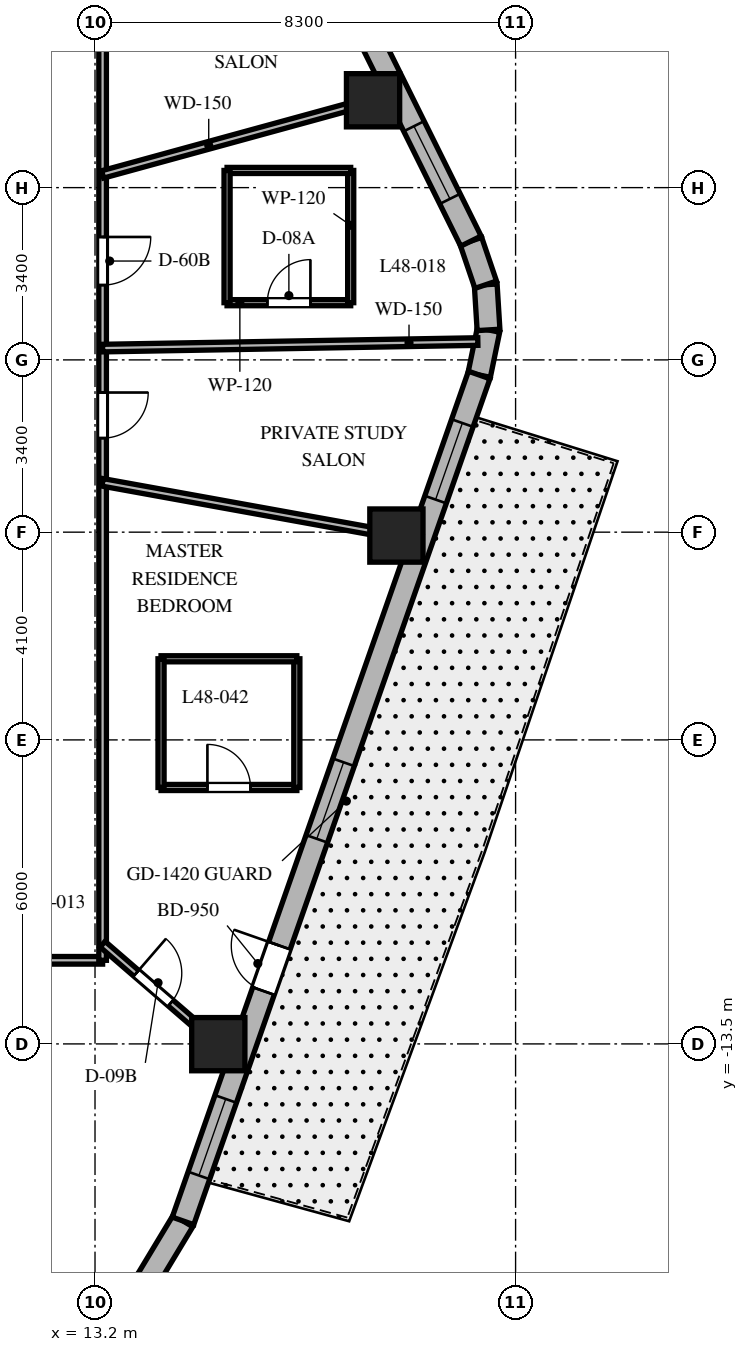
"""IFC4 building model, lengths in metres.
Left out: names, types, materials, properties, quantities, classifications, styles, units other than length and angle.
Written with IfcOpenShell. Run it as: python <this file> out.ifc"""

import sys

from ifc_helpers import new_model, si_unit, direction, frame, frame_2d, origin, origin_2d, place, context, subcontext, project, spatial, rectangle, extrude, element, fill, save


model = new_model("IFC4")
c1 = context("Model", 3, precision=1e-05, world=origin(), true_north=direction((0.0, 1.0)))
c2 = subcontext(c1, "Body", "Model", "MODEL_VIEW")
j1 = project(units=[si_unit("LENGTHUNIT", "METRE"), si_unit("PLANEANGLEUNIT", "RADIAN")], contexts=[c1])
p1 = place(None, origin())
s1 = spatial("IfcSite", under=j1, at=p1, CompositionType="ELEMENT")
p2 = place(p1, origin())
s2 = spatial("IfcBuilding", under=s1, at=p2, CompositionType="ELEMENT")
p3 = place(p2, frame((0.0, 0.0, 194.1)))
s3 = spatial("IfcBuildingStorey", under=s2, at=p3, CompositionType="ELEMENT", Elevation=194.1)
for number, where, z_axis, x_axis in (
    (1, (15.633, -13.505, 0.0), (0.0, 0.0, 1.0), (1.0, 0.0, 0.0)),
    (2, (19.148, -3.467, 0.0), (0.0, 0.0, 1.0), (1.0, 0.0, 0.0)),
    (3, (18.687, 5.124, 0.0), (0.0, 0.0, 1.0), (1.0, 0.0, 0.0)),
):
    element("IfcColumn", number, at=place(p3, frame(where, z_axis=z_axis, x_axis=x_axis)), inside=s3, PredefinedType="COLUMN", context=c2, shape_type="SweptSolid", body=[
        extrude(rectangle(XDim=1.05, YDim=1.05, at=origin_2d()), origin(), (0.0, 0.0, 1.0), 3.7),
    ])
p4 = place(p3, frame((14.214, -18.192, 0.0), z_axis=(0.0, 0.0, 1.0), x_axis=(0.516340945502, 0.856383108193, 0.0)))
e4 = element("IfcWall", 4, at=p4, inside=s3, PredefinedType="SOLIDWALL", context=c2, shape_type="SweptSolid", body=[
    extrude(rectangle(XDim=1.4, YDim=0.45, at=frame_2d((0.7, 0.0))), origin(), (0.0, 0.0, 1.0), 3.4),
])
p5 = place(p3, frame((20.782, -0.298, 0.0), z_axis=(0.0, 0.0, 1.0), x_axis=(0.202570068411, 0.979267771033, 0.0)))
e5 = element("IfcWall", 5, at=p5, inside=s3, PredefinedType="SOLIDWALL", context=c2, shape_type="SweptSolid", body=[
    extrude(rectangle(XDim=0.909, YDim=0.45, at=frame_2d((0.454, 0.0))), origin(), (0.0, 0.0, 1.0), 3.4),
])
p6 = place(p3, frame((20.966, 0.592, 0.0), z_axis=(0.0, 0.0, 1.0), x_axis=(-0.061748898935, 0.998091715966, 0.0)))
e6 = element("IfcWall", 6, at=p6, inside=s3, PredefinedType="SOLIDWALL", context=c2, shape_type="SweptSolid", body=[
    extrude(rectangle(XDim=0.894, YDim=0.45, at=frame_2d((0.447, 0.0))), origin(), (0.0, 0.0, 1.0), 3.4),
])
p7 = place(p3, frame((20.911, 1.484, 0.0), z_axis=(0.0, 0.0, 1.0), x_axis=(-0.321623334353, 0.946867694453, 0.0)))
e7 = element("IfcWall", 7, at=p7, inside=s3, PredefinedType="SOLIDWALL", context=c2, shape_type="SweptSolid", body=[
    extrude(rectangle(XDim=0.909, YDim=0.45, at=frame_2d((0.454, 0.0))), origin(), (0.0, 0.0, 1.0), 3.4),
])
p8 = place(p3, frame((14.937, -16.993, 0.0), z_axis=(0.0, 0.0, 1.0), x_axis=(0.330431575061, 0.943829949834, 0.0)))
e8 = element("IfcWall", 8, at=p8, inside=s3, PredefinedType="SOLIDWALL", context=c2, shape_type="SweptSolid", body=[
    extrude(rectangle(XDim=17.689, YDim=0.45, at=frame_2d((8.844, 0.0))), origin(), (0.0, 0.0, 1.0), 3.4),
])
p9 = place(p8, frame((4.807, 0.0, 0.0)))
e9 = element("IfcOpeningElement", 9, at=p9, cuts=e8, PredefinedType="OPENING", context=c2, shape_type="SweptSolid", body=[
    extrude(rectangle(XDim=0.95, YDim=2.15, at=frame_2d((0.475, 1.075))), frame((0.0, 0.235, 0.0), z_axis=(0.0, -1.0, 0.0), x_axis=(1.0, 0.0, 0.0)), (0.0, 0.0, 1.0), 0.47),
])
p10 = place(p8, frame((0.95, 0.0, 0.8)))
e10 = element("IfcOpeningElement", 10, at=p10, cuts=e8, PredefinedType="OPENING", context=c2, shape_type="SweptSolid", body=[
    extrude(rectangle(XDim=1.6, YDim=1.75, at=frame_2d((0.8, 0.875))), frame((0.0, 0.235, 0.0), z_axis=(0.0, -1.0, 0.0), x_axis=(1.0, 0.0, 0.0)), (0.0, 0.0, 1.0), 0.47),
])
p11 = place(p8, frame((7.99, 0.0, 0.8)))
e11 = element("IfcOpeningElement", 11, at=p11, cuts=e8, PredefinedType="OPENING", context=c2, shape_type="SweptSolid", body=[
    extrude(rectangle(XDim=1.6, YDim=1.75, at=frame_2d((0.8, 0.875))), frame((0.0, 0.235, 0.0), z_axis=(0.0, -1.0, 0.0), x_axis=(1.0, 0.0, 0.0)), (0.0, 0.0, 1.0), 0.47),
])
p12 = place(p8, frame((15.084, 0.0, 0.8)))
e12 = element("IfcOpeningElement", 12, at=p12, cuts=e8, PredefinedType="OPENING", context=c2, shape_type="SweptSolid", body=[
    extrude(rectangle(XDim=1.6, YDim=1.75, at=frame_2d((0.8, 0.875))), frame((0.0, 0.235, 0.0), z_axis=(0.0, -1.0, 0.0), x_axis=(1.0, 0.0, 0.0)), (0.0, 0.0, 1.0), 0.47),
])
p13 = place(p3, frame((20.618, 2.344, 0.0), z_axis=(0.0, 0.0, 1.0), x_axis=(-0.444243691097, 0.895905990002, 0.0)))
e13 = element("IfcWall", 13, at=p13, inside=s3, PredefinedType="SOLIDWALL", context=c2, shape_type="SweptSolid", body=[
    extrude(rectangle(XDim=16.784, YDim=0.45, at=frame_2d((8.392, 0.0))), origin(), (0.0, 0.0, 1.0), 3.4),
])
p14 = place(p13, frame((0.931, 0.0, 0.8)))
e14 = element("IfcOpeningElement", 14, at=p14, cuts=e13, PredefinedType="OPENING", context=c2, shape_type="SweptSolid", body=[
    extrude(rectangle(XDim=1.6, YDim=1.75, at=frame_2d((0.8, 0.875))), frame((0.0, 0.235, 0.0), z_axis=(0.0, -1.0, 0.0), x_axis=(1.0, 0.0, 0.0)), (0.0, 0.0, 1.0), 0.47),
])
p15 = place(p13, frame((7.642, 0.0, 0.8)))
e15 = element("IfcOpeningElement", 15, at=p15, cuts=e13, PredefinedType="OPENING", context=c2, shape_type="SweptSolid", body=[
    extrude(rectangle(XDim=1.6, YDim=1.75, at=frame_2d((0.8, 0.875))), frame((0.0, 0.235, 0.0), z_axis=(0.0, -1.0, 0.0), x_axis=(1.0, 0.0, 0.0)), (0.0, 0.0, 1.0), 0.47),
])
p16 = place(p13, frame((14.303, 0.0, 0.8)))
e16 = element("IfcOpeningElement", 16, at=p16, cuts=e13, PredefinedType="OPENING", context=c2, shape_type="SweptSolid", body=[
    extrude(rectangle(XDim=1.6, YDim=1.75, at=frame_2d((0.8, 0.875))), frame((0.0, 0.235, 0.0), z_axis=(0.0, -1.0, 0.0), x_axis=(1.0, 0.0, 0.0)), (0.0, 0.0, 1.0), 0.47),
])
p17 = place(p3, frame((13.35, -11.85, 0.0), z_axis=(0.0, 0.0, 1.0), x_axis=(-1.0, 0.0, 0.0)))
e17 = element("IfcWall", 17, at=p17, inside=s3, PredefinedType="PARTITIONING", context=c2, shape_type="SweptSolid", body=[
    extrude(rectangle(XDim=26.7, YDim=0.15, at=frame_2d((13.35, 0.0))), origin(), (0.0, 0.0, 1.0), 2.84),
])
p18 = place(p17, frame((20.682, 0.0, 0.0)))
e18 = element("IfcOpeningElement", 18, at=p18, cuts=e17, PredefinedType="OPENING", context=c2, shape_type="SweptSolid", body=[
    extrude(rectangle(XDim=0.95, YDim=2.03, at=frame_2d((0.475, 1.015))), frame((0.0, 0.085, 0.0), z_axis=(0.0, -1.0, 0.0), x_axis=(1.0, 0.0, 0.0)), (0.0, 0.0, 1.0), 0.17),
])
p19 = place(p17, frame((14.708, 0.0, 0.0)))
e19 = element("IfcOpeningElement", 19, at=p19, cuts=e17, PredefinedType="OPENING", context=c2, shape_type="SweptSolid", body=[
    extrude(rectangle(XDim=0.95, YDim=2.03, at=frame_2d((0.475, 1.015))), frame((0.0, 0.085, 0.0), z_axis=(0.0, -1.0, 0.0), x_axis=(1.0, 0.0, 0.0)), (0.0, 0.0, 1.0), 0.17),
])
p20 = place(p17, frame((10.553, 0.0, 0.0)))
e20 = element("IfcOpeningElement", 20, at=p20, cuts=e17, PredefinedType="OPENING", context=c2, shape_type="SweptSolid", body=[
    extrude(rectangle(XDim=0.95, YDim=2.03, at=frame_2d((0.475, 1.015))), frame((0.0, 0.085, 0.0), z_axis=(0.0, -1.0, 0.0), x_axis=(1.0, 0.0, 0.0)), (0.0, 0.0, 1.0), 0.17),
])
p21 = place(p17, frame((3.97, 0.0, 0.0)))
e21 = element("IfcOpeningElement", 21, at=p21, cuts=e17, PredefinedType="OPENING", context=c2, shape_type="SweptSolid", body=[
    extrude(rectangle(XDim=1.0, YDim=2.03, at=frame_2d((0.5, 1.015))), frame((0.0, 0.085, 0.0), z_axis=(0.0, -1.0, 0.0), x_axis=(1.0, 0.0, 0.0)), (0.0, 0.0, 1.0), 0.17),
])
p22 = place(p3, frame((13.35, 11.85, 0.0), z_axis=(0.0, 0.0, 1.0), x_axis=(0.0, -1.0, 0.0)))
e22 = element("IfcWall", 22, at=p22, inside=s3, PredefinedType="PARTITIONING", context=c2, shape_type="SweptSolid", body=[
    extrude(rectangle(XDim=23.7, YDim=0.15, at=frame_2d((11.85, 0.0))), origin(), (0.0, 0.0, 1.0), 2.84),
])
p23 = place(p22, frame((9.424, 0.0, 0.0)))
e23 = element("IfcOpeningElement", 23, at=p23, cuts=e22, PredefinedType="OPENING", context=c2, shape_type="SweptSolid", body=[
    extrude(rectangle(XDim=0.95, YDim=2.03, at=frame_2d((0.475, 1.015))), frame((0.0, 0.085, 0.0), z_axis=(0.0, -1.0, 0.0), x_axis=(1.0, 0.0, 0.0)), (0.0, 0.0, 1.0), 0.17),
])
p24 = place(p22, frame((3.765, 0.0, 0.0)))
e24 = element("IfcOpeningElement", 24, at=p24, cuts=e22, PredefinedType="OPENING", context=c2, shape_type="SweptSolid", body=[
    extrude(rectangle(XDim=0.9, YDim=2.03, at=frame_2d((0.45, 1.015))), frame((0.0, 0.085, 0.0), z_axis=(0.0, -1.0, 0.0), x_axis=(1.0, 0.0, 0.0)), (0.0, 0.0, 1.0), 0.17),
])
p25 = place(p22, frame((12.494, 0.0, 0.0)))
e25 = element("IfcOpeningElement", 25, at=p25, cuts=e22, PredefinedType="OPENING", context=c2, shape_type="SweptSolid", body=[
    extrude(rectangle(XDim=0.9, YDim=2.03, at=frame_2d((0.45, 1.015))), frame((0.0, 0.085, 0.0), z_axis=(0.0, -1.0, 0.0), x_axis=(1.0, 0.0, 0.0)), (0.0, 0.0, 1.0), 0.17),
])
p26 = place(p3, frame((13.35, 0.233, 0.0), z_axis=(0.0, 0.0, 1.0), x_axis=(0.999847932133, 0.017438824797, 0.0)))
e26 = element("IfcWall", 26, at=p26, inside=s3, PredefinedType="PARTITIONING", context=c2, shape_type="SweptSolid", body=[
    extrude(rectangle(XDim=7.406, YDim=0.15, at=frame_2d((3.703, 0.0))), origin(), (0.0, 0.0, 1.0), 2.64),
])
p27 = place(p3, frame((13.35, 3.661, 0.0), z_axis=(0.0, 0.0, 1.0), x_axis=(0.964397145454, 0.264458211898, 0.0)))
e27 = element("IfcWall", 27, at=p27, inside=s3, PredefinedType="PARTITIONING", context=c2, shape_type="SweptSolid", body=[
    extrude(rectangle(XDim=6.039, YDim=0.15, at=frame_2d((3.019, 0.0))), origin(), (0.0, 0.0, 1.0), 2.64),
])
p28 = place(p3, frame((13.35, -11.533, 0.0), z_axis=(0.0, 0.0, 1.0), x_axis=(0.756711647314, -0.65374879183, 0.0)))
e28 = element("IfcWall", 28, at=p28, inside=s3, PredefinedType="PARTITIONING", context=c2, shape_type="SweptSolid", body=[
    extrude(rectangle(XDim=3.55, YDim=0.15, at=frame_2d((1.775, 0.0))), origin(), (0.0, 0.0, 1.0), 2.64),
])
p29 = place(p28, frame((0.875, 0.0, 0.0)))
e29 = element("IfcOpeningElement", 29, at=p29, cuts=e28, PredefinedType="OPENING", context=c2, shape_type="SweptSolid", body=[
    extrude(rectangle(XDim=0.9, YDim=2.03, at=frame_2d((0.45, 1.015))), frame((0.0, 0.085, 0.0), z_axis=(0.0, -1.0, 0.0), x_axis=(1.0, 0.0, 0.0)), (0.0, 0.0, 1.0), 0.17),
])
p30 = place(p3, frame((13.35, -2.417, 0.0), z_axis=(0.0, 0.0, 1.0), x_axis=(0.98399796473, -0.178179699761, 0.0)))
e30 = element("IfcWall", 30, at=p30, inside=s3, PredefinedType="PARTITIONING", context=c2, shape_type="SweptSolid", body=[
    extrude(rectangle(XDim=6.393, YDim=0.15, at=frame_2d((3.197, 0.0))), origin(), (0.0, 0.0, 1.0), 2.64),
])
p31 = place(p3, frame((15.806, 1.129, 0.0), z_axis=(0.0, 0.0, 1.0), x_axis=(1.0, 0.0, 0.0)))
e31 = element("IfcWall", 31, at=p31, inside=s3, PredefinedType="PARTITIONING", context=c2, shape_type="SweptSolid", body=[
    extrude(rectangle(XDim=2.44, YDim=0.12, at=frame_2d((1.22, 0.0))), origin(), (0.0, 0.0, 1.0), 3.4),
])
p32 = place(p31, frame((0.795, 0.0, 0.0)))
e32 = element("IfcOpeningElement", 32, at=p32, cuts=e31, PredefinedType="OPENING", context=c2, shape_type="SweptSolid", body=[
    extrude(rectangle(XDim=0.85, YDim=2.03, at=frame_2d((0.425, 1.015))), frame((0.0, 0.07, 0.0), z_axis=(0.0, -1.0, 0.0), x_axis=(1.0, 0.0, 0.0)), (0.0, 0.0, 1.0), 0.14),
])
p33 = place(p3, frame((18.246, 1.129, 0.0), z_axis=(0.0, 0.0, 1.0), x_axis=(0.0, 1.0, 0.0)))
e33 = element("IfcWall", 33, at=p33, inside=s3, PredefinedType="PARTITIONING", context=c2, shape_type="SweptSolid", body=[
    extrude(rectangle(XDim=2.61, YDim=0.12, at=frame_2d((1.305, 0.0))), origin(), (0.0, 0.0, 1.0), 3.4),
])
p34 = place(p3, frame((18.246, 3.739, 0.0), z_axis=(0.0, 0.0, 1.0), x_axis=(-1.0, 0.0, 0.0)))
e34 = element("IfcWall", 34, at=p34, inside=s3, PredefinedType="PARTITIONING", context=c2, shape_type="SweptSolid", body=[
    extrude(rectangle(XDim=2.44, YDim=0.12, at=frame_2d((1.22, 0.0))), origin(), (0.0, 0.0, 1.0), 3.4),
])
p35 = place(p3, frame((15.806, 3.739, 0.0), z_axis=(0.0, 0.0, 1.0), x_axis=(0.0, -1.0, 0.0)))
e35 = element("IfcWall", 35, at=p35, inside=s3, PredefinedType="PARTITIONING", context=c2, shape_type="SweptSolid", body=[
    extrude(rectangle(XDim=2.61, YDim=0.12, at=frame_2d((1.305, 0.0))), origin(), (0.0, 0.0, 1.0), 2.84),
])
p36 = place(p3, frame((14.503, -8.439, 0.0), z_axis=(0.0, 0.0, 1.0), x_axis=(1.0, 0.0, 0.0)))
e36 = element("IfcWall", 36, at=p36, inside=s3, PredefinedType="PARTITIONING", context=c2, shape_type="SweptSolid", body=[
    extrude(rectangle(XDim=2.68, YDim=0.12, at=frame_2d((1.34, 0.0))), origin(), (0.0, 0.0, 1.0), 2.972),
])
p37 = place(p36, frame((0.915, 0.0, 0.0)))
e37 = element("IfcOpeningElement", 37, at=p37, cuts=e36, PredefinedType="OPENING", context=c2, shape_type="SweptSolid", body=[
    extrude(rectangle(XDim=0.85, YDim=2.03, at=frame_2d((0.425, 1.015))), frame((0.0, 0.07, 0.0), z_axis=(0.0, -1.0, 0.0), x_axis=(1.0, 0.0, 0.0)), (0.0, 0.0, 1.0), 0.14),
])
p38 = place(p3, frame((17.183, -8.439, 0.0), z_axis=(0.0, 0.0, 1.0), x_axis=(0.0, 1.0, 0.0)))
e38 = element("IfcWall", 38, at=p38, inside=s3, PredefinedType="PARTITIONING", context=c2, shape_type="SweptSolid", body=[
    extrude(rectangle(XDim=2.54, YDim=0.12, at=frame_2d((1.27, 0.0))), origin(), (0.0, 0.0, 1.0), 2.64),
])
p39 = place(p3, frame((17.183, -5.899, 0.0), z_axis=(0.0, 0.0, 1.0), x_axis=(-1.0, 0.0, 0.0)))
e39 = element("IfcWall", 39, at=p39, inside=s3, PredefinedType="PARTITIONING", context=c2, shape_type="SweptSolid", body=[
    extrude(rectangle(XDim=2.68, YDim=0.12, at=frame_2d((1.34, 0.0))), origin(), (0.0, 0.0, 1.0), 2.972),
])
p40 = place(p3, frame((14.503, -5.899, 0.0), z_axis=(0.0, 0.0, 1.0), x_axis=(0.0, -1.0, 0.0)))
e40 = element("IfcWall", 40, at=p40, inside=s3, PredefinedType="PARTITIONING", context=c2, shape_type="SweptSolid", body=[
    extrude(rectangle(XDim=2.54, YDim=0.12, at=frame_2d((1.27, 0.0))), origin(), (0.0, 0.0, 1.0), 3.4),
])
p41 = place(p9, origin())
e41 = element("IfcDoor", 41, at=p41, inside=s3, OperationType="SINGLE_SWING_RIGHT", PredefinedType="DOOR", context=c2, shape_type="SweptSolid", body=[
    extrude(rectangle(XDim=0.95, YDim=2.15, at=frame_2d((0.475, 1.075))), frame((0.0, 0.025, 0.0), z_axis=(0.0, -1.0, 0.0), x_axis=(1.0, 0.0, 0.0)), (0.0, 0.0, 1.0), 0.05),
])
fill(e9, e41)
p42 = place(p10, origin())
e42 = element("IfcWindow", 42, at=p42, inside=s3, PartitioningType="SINGLE_PANEL", PredefinedType="WINDOW", context=c2, shape_type="SweptSolid", body=[
    extrude(rectangle(XDim=1.6, YDim=1.75, at=frame_2d((0.8, 0.875))), frame((0.0, 0.03, 0.0), z_axis=(0.0, -1.0, 0.0), x_axis=(1.0, 0.0, 0.0)), (0.0, 0.0, 1.0), 0.06),
])
fill(e10, e42)
p43 = place(p11, origin())
e43 = element("IfcWindow", 43, at=p43, inside=s3, PartitioningType="SINGLE_PANEL", PredefinedType="WINDOW", context=c2, shape_type="SweptSolid", body=[
    extrude(rectangle(XDim=1.6, YDim=1.75, at=frame_2d((0.8, 0.875))), frame((0.0, 0.03, 0.0), z_axis=(0.0, -1.0, 0.0), x_axis=(1.0, 0.0, 0.0)), (0.0, 0.0, 1.0), 0.06),
])
fill(e11, e43)
p44 = place(p12, origin())
e44 = element("IfcWindow", 44, at=p44, inside=s3, PartitioningType="SINGLE_PANEL", PredefinedType="WINDOW", context=c2, shape_type="SweptSolid", body=[
    extrude(rectangle(XDim=1.6, YDim=1.75, at=frame_2d((0.8, 0.875))), frame((0.0, 0.03, 0.0), z_axis=(0.0, -1.0, 0.0), x_axis=(1.0, 0.0, 0.0)), (0.0, 0.0, 1.0), 0.06),
])
fill(e12, e44)
p45 = place(p14, origin())
e45 = element("IfcWindow", 45, at=p45, inside=s3, PartitioningType="SINGLE_PANEL", PredefinedType="WINDOW", context=c2, shape_type="SweptSolid", body=[
    extrude(rectangle(XDim=1.6, YDim=1.75, at=frame_2d((0.8, 0.875))), frame((0.0, 0.03, 0.0), z_axis=(0.0, -1.0, 0.0), x_axis=(1.0, 0.0, 0.0)), (0.0, 0.0, 1.0), 0.06),
])
fill(e14, e45)
p46 = place(p23, origin())
e46 = element("IfcDoor", 46, at=p46, inside=s3, OperationType="SINGLE_SWING_LEFT", PredefinedType="DOOR", context=c2, shape_type="SweptSolid", body=[
    extrude(rectangle(XDim=0.95, YDim=2.03, at=frame_2d((0.475, 1.015))), frame((0.0, 0.025, 0.0), z_axis=(0.0, -1.0, 0.0), x_axis=(1.0, 0.0, 0.0)), (0.0, 0.0, 1.0), 0.05),
])
fill(e23, e46)
p47 = place(p32, origin())
e47 = element("IfcDoor", 47, at=p47, inside=s3, OperationType="SINGLE_SWING_RIGHT", PredefinedType="DOOR", context=c2, shape_type="SweptSolid", body=[
    extrude(rectangle(XDim=0.85, YDim=2.03, at=frame_2d((0.425, 1.015))), frame((0.0, 0.025, 0.0), z_axis=(0.0, -1.0, 0.0), x_axis=(1.0, 0.0, 0.0)), (0.0, 0.0, 1.0), 0.05),
])
fill(e32, e47)
p48 = place(p29, origin())
e48 = element("IfcDoor", 48, at=p48, inside=s3, OperationType="SINGLE_SWING_LEFT", PredefinedType="DOOR", context=c2, shape_type="SweptSolid", body=[
    extrude(rectangle(XDim=0.9, YDim=2.03, at=frame_2d((0.45, 1.015))), frame((0.0, 0.025, 0.0), z_axis=(0.0, -1.0, 0.0), x_axis=(1.0, 0.0, 0.0)), (0.0, 0.0, 1.0), 0.05),
])
fill(e29, e48)
p49 = place(p37, origin())
e49 = element("IfcDoor", 49, at=p49, inside=s3, OperationType="SINGLE_SWING_LEFT", PredefinedType="DOOR", context=c2, shape_type="SweptSolid", body=[
    extrude(rectangle(XDim=0.85, YDim=2.03, at=frame_2d((0.425, 1.015))), frame((0.0, 0.025, 0.0), z_axis=(0.0, -1.0, 0.0), x_axis=(1.0, 0.0, 0.0)), (0.0, 0.0, 1.0), 0.05),
])
fill(e37, e49)
p50 = place(p25, origin())
e50 = element("IfcDoor", 50, at=p50, inside=s3, OperationType="SINGLE_SWING_LEFT", PredefinedType="DOOR", context=c2, shape_type="SweptSolid", body=[
    extrude(rectangle(XDim=0.9, YDim=2.03, at=frame_2d((0.45, 1.015))), frame((0.0, 0.025, 0.0), z_axis=(0.0, -1.0, 0.0), x_axis=(1.0, 0.0, 0.0)), (0.0, 0.0, 1.0), 0.05),
])
fill(e25, e50)
save(model, sys.argv[1])
